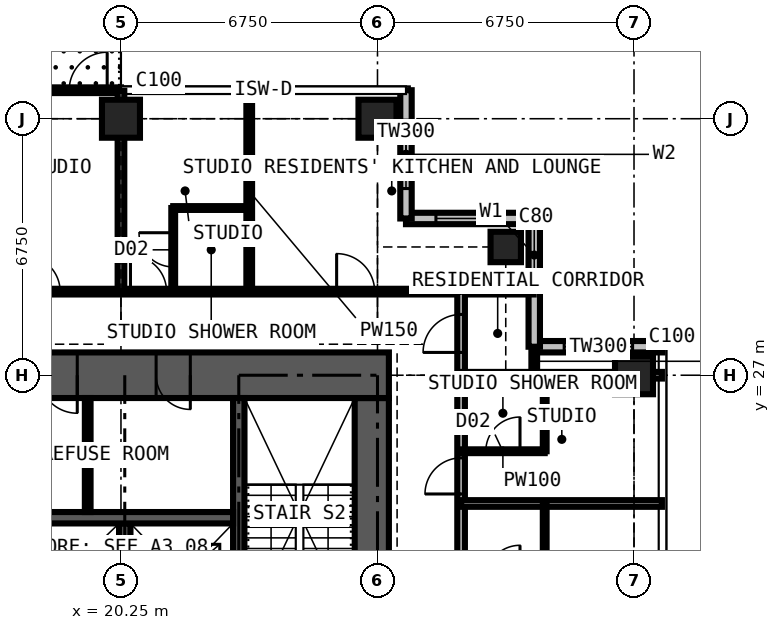
"""IFC4 building model, lengths in metres.
Left out: names, types, materials, properties, quantities, classifications, styles, units other than length and angle.
Written with IfcOpenShell. Run it as: python <this file> out.ifc"""

import sys

from ifc_helpers import new_model, si_unit, direction, frame, frame_2d, origin, origin_2d, place, context, subcontext, project, spatial, rectangle, extrude, element, fill, save


model = new_model("IFC4")
c1 = context("Model", 3, precision=1e-05, world=origin(), true_north=direction((0.0, 1.0)))
c2 = subcontext(c1, "Body", "Model", "MODEL_VIEW")
j1 = project(units=[si_unit("LENGTHUNIT", "METRE"), si_unit("PLANEANGLEUNIT", "RADIAN")], contexts=[c1])
p1 = place(None, origin())
s1 = spatial("IfcSite", under=j1, at=p1, CompositionType="ELEMENT")
p2 = place(p1, origin())
s2 = spatial("IfcBuilding", under=s1, at=p2, CompositionType="ELEMENT")
p3 = place(p2, frame((0.0, 0.0, 240.3)))
s3 = spatial("IfcBuildingStorey", under=s2, at=p3, CompositionType="ELEMENT", Elevation=240.3)
for number, where, z_axis, x_axis in (
    (1, (20.25, 33.75, 0.0), (0.0, 0.0, 1.0), (1.0, 0.0, 0.0)),
    (2, (27.0, 33.75, 0.0), (0.0, 0.0, 1.0), (1.0, 0.0, 0.0)),
):
    element("IfcColumn", number, at=place(p3, frame(where, z_axis=z_axis, x_axis=x_axis)), inside=s3, PredefinedType="COLUMN", context=c2, shape_type="SweptSolid", body=[
        extrude(rectangle(XDim=1.0, YDim=1.0, at=origin_2d()), origin(), (0.0, 0.0, 1.0), 3.6),
    ])
p4 = place(p3, frame((30.375, 30.375, 0.0), z_axis=(0.0, 0.0, 1.0), x_axis=(1.0, 0.0, 0.0)))
e3 = element("IfcColumn", 3, at=p4, inside=s3, PredefinedType="COLUMN", context=c2, shape_type="SweptSolid", body=[
    extrude(rectangle(XDim=0.8, YDim=0.8, at=origin_2d()), origin(), (0.0, 0.0, 1.0), 3.6),
])
p5 = place(p3, frame((33.75, 27.0, 0.0), z_axis=(0.0, 0.0, 1.0), x_axis=(1.0, 0.0, 0.0)))
e4 = element("IfcColumn", 4, at=p5, inside=s3, PredefinedType="COLUMN", context=c2, shape_type="SweptSolid", body=[
    extrude(rectangle(XDim=1.0, YDim=1.0, at=origin_2d()), origin(), (0.0, 0.0, 1.0), 3.6),
])
p6 = place(p3, frame((26.85, 14.1, 0.0), z_axis=(0.0, 0.0, 1.0), x_axis=(0.0, 1.0, 0.0)))
e5 = element("IfcWall", 5, at=p6, inside=s3, PredefinedType="SHEAR", context=c2, shape_type="SweptSolid", body=[
    extrude(rectangle(XDim=12.3, YDim=0.9, at=frame_2d((6.15, 0.0))), origin(), (0.0, 0.0, 1.0), 3.6),
])
p7 = place(p6, frame((3.65, 0.0, 0.0)))
e6 = element("IfcOpeningElement", 6, at=p7, cuts=e5, PredefinedType="OPENING", context=c2, shape_type="SweptSolid", body=[
    extrude(rectangle(XDim=1.2, YDim=2.2, at=frame_2d((0.6, 1.1))), frame((0.0, 0.46, 0.0), z_axis=(0.0, -1.0, 0.0), x_axis=(1.0, 0.0, 0.0)), (0.0, 0.0, 1.0), 0.92),
])
p8 = place(p3, frame((27.3, 27.0, 0.0), z_axis=(0.0, 0.0, 1.0), x_axis=(-1.0, 0.0, 0.0)))
e7 = element("IfcWall", 7, at=p8, inside=s3, PredefinedType="SHEAR", context=c2, shape_type="SweptSolid", body=[
    extrude(rectangle(XDim=14.1, YDim=1.2, at=frame_2d((7.05, 0.0))), origin(), (0.0, 0.0, 1.0), 3.6),
])
p9 = place(p8, frame((5.225, 0.0, 0.0)))
e8 = element("IfcOpeningElement", 8, at=p9, cuts=e7, PredefinedType="OPENING", context=c2, shape_type="SweptSolid", body=[
    extrude(rectangle(XDim=0.9, YDim=2.2, at=frame_2d((0.45, 1.1))), frame((0.0, 0.61, 0.0), z_axis=(0.0, -1.0, 0.0), x_axis=(1.0, 0.0, 0.0)), (0.0, 0.0, 1.0), 1.22),
])
p10 = place(p8, frame((8.2, 0.0, 0.0)))
e9 = element("IfcOpeningElement", 9, at=p10, cuts=e7, PredefinedType="OPENING", context=c2, shape_type="SweptSolid", body=[
    extrude(rectangle(XDim=1.0, YDim=2.2, at=frame_2d((0.5, 1.1))), frame((0.0, 0.61, 0.0), z_axis=(0.0, -1.0, 0.0), x_axis=(1.0, 0.0, 0.0)), (0.0, 0.0, 1.0), 1.22),
])
p11 = place(p3, frame((34.5, 27.75, 0.0), z_axis=(0.0, 0.0, 1.0), x_axis=(-1.0, 0.0, 0.0)))
e10 = element("IfcWall", 10, at=p11, inside=s3, PredefinedType="SOLIDWALL", context=c2, shape_type="SweptSolid", body=[
    extrude(rectangle(XDim=3.375, YDim=0.3, at=frame_2d((1.688, 0.0))), origin(), (0.0, 0.0, 1.0), 3.375),
])
p12 = place(p11, frame((0.788, 0.0, 0.6)))
e11 = element("IfcOpeningElement", 11, at=p12, cuts=e10, PredefinedType="OPENING", context=c2, shape_type="SweptSolid", body=[
    extrude(rectangle(XDim=1.8, YDim=2.1, at=frame_2d((0.9, 1.05))), frame((0.0, 0.16, 0.0), z_axis=(0.0, -1.0, 0.0), x_axis=(1.0, 0.0, 0.0)), (0.0, 0.0, 1.0), 0.32),
])
p13 = place(p3, frame((31.125, 27.75, 0.0), z_axis=(0.0, 0.0, 1.0), x_axis=(0.0, 1.0, 0.0)))
e12 = element("IfcWall", 12, at=p13, inside=s3, PredefinedType="SOLIDWALL", context=c2, shape_type="SweptSolid", body=[
    extrude(rectangle(XDim=3.375, YDim=0.3, at=frame_2d((1.688, 0.0))), origin(), (0.0, 0.0, 1.0), 3.375),
])
p14 = place(p13, frame((1.663, 0.0, 0.9)))
e13 = element("IfcOpeningElement", 13, at=p14, cuts=e12, PredefinedType="OPENING", context=c2, shape_type="SweptSolid", body=[
    extrude(rectangle(XDim=1.5, YDim=1.8, at=frame_2d((0.75, 0.9))), frame((0.0, 0.16, 0.0), z_axis=(0.0, -1.0, 0.0), x_axis=(1.0, 0.0, 0.0)), (0.0, 0.0, 1.0), 0.32),
])
p15 = place(p3, frame((31.125, 31.125, 0.0), z_axis=(0.0, 0.0, 1.0), x_axis=(-1.0, 0.0, 0.0)))
e14 = element("IfcWall", 14, at=p15, inside=s3, PredefinedType="SOLIDWALL", context=c2, shape_type="SweptSolid", body=[
    extrude(rectangle(XDim=3.375, YDim=0.3, at=frame_2d((1.688, 0.0))), origin(), (0.0, 0.0, 1.0), 3.375),
])
p16 = place(p15, frame((0.788, 0.0, 0.6)))
e15 = element("IfcOpeningElement", 15, at=p16, cuts=e14, PredefinedType="OPENING", context=c2, shape_type="SweptSolid", body=[
    extrude(rectangle(XDim=1.8, YDim=2.1, at=frame_2d((0.9, 1.05))), frame((0.0, 0.16, 0.0), z_axis=(0.0, -1.0, 0.0), x_axis=(1.0, 0.0, 0.0)), (0.0, 0.0, 1.0), 0.32),
])
p17 = place(p3, frame((27.75, 31.125, 0.0), z_axis=(0.0, 0.0, 1.0), x_axis=(0.0, 1.0, 0.0)))
e16 = element("IfcWall", 16, at=p17, inside=s3, PredefinedType="SOLIDWALL", context=c2, shape_type="SweptSolid", body=[
    extrude(rectangle(XDim=3.375, YDim=0.3, at=frame_2d((1.688, 0.0))), origin(), (0.0, 0.0, 1.0), 3.375),
])
p18 = place(p17, frame((0.788, 0.0, 0.6)))
e17 = element("IfcOpeningElement", 17, at=p18, cuts=e16, PredefinedType="OPENING", context=c2, shape_type="SweptSolid", body=[
    extrude(rectangle(XDim=1.8, YDim=2.1, at=frame_2d((0.9, 1.05))), frame((0.0, 0.16, 0.0), z_axis=(0.0, -1.0, 0.0), x_axis=(1.0, 0.0, 0.0)), (0.0, 0.0, 1.0), 0.32),
])
p19 = place(p3, frame((13.5, 34.5, 0.0), z_axis=(0.0, 0.0, 1.0), x_axis=(1.0, 0.0, 0.0)))
e18 = element("IfcWall", 18, at=p19, inside=s3, PredefinedType="SOLIDWALL", context=c2, shape_type="SweptSolid", body=[
    extrude(rectangle(XDim=6.75, YDim=0.15, at=frame_2d((3.375, 0.0))), origin(), (0.0, 0.0, 1.0), 3.375),
])
p20 = place(p19, frame((0.363, 0.0, 0.0)))
e19 = element("IfcOpeningElement", 19, at=p20, cuts=e18, PredefinedType="OPENING", context=c2, shape_type="SweptSolid", body=[
    extrude(rectangle(XDim=1.0, YDim=2.2, at=frame_2d((0.5, 1.1))), frame((0.0, 0.085, 0.0), z_axis=(0.0, -1.0, 0.0), x_axis=(1.0, 0.0, 0.0)), (0.0, 0.0, 1.0), 0.17),
])
p21 = place(p19, frame((1.725, 0.0, 0.9)))
e20 = element("IfcOpeningElement", 20, at=p21, cuts=e18, PredefinedType="OPENING", context=c2, shape_type="SweptSolid", body=[
    extrude(rectangle(XDim=1.2, YDim=1.8, at=frame_2d((0.6, 0.9))), frame((0.0, 0.085, 0.0), z_axis=(0.0, -1.0, 0.0), x_axis=(1.0, 0.0, 0.0)), (0.0, 0.0, 1.0), 0.17),
])
p22 = place(p19, frame((5.387, 0.0, 0.0)))
e21 = element("IfcOpeningElement", 21, at=p22, cuts=e18, PredefinedType="OPENING", context=c2, shape_type="SweptSolid", body=[
    extrude(rectangle(XDim=1.0, YDim=2.2, at=frame_2d((0.5, 1.1))), frame((0.0, 0.085, 0.0), z_axis=(0.0, -1.0, 0.0), x_axis=(1.0, 0.0, 0.0)), (0.0, 0.0, 1.0), 0.17),
])
p23 = place(p19, frame((3.825, 0.0, 0.9)))
e22 = element("IfcOpeningElement", 22, at=p23, cuts=e18, PredefinedType="OPENING", context=c2, shape_type="SweptSolid", body=[
    extrude(rectangle(XDim=1.2, YDim=1.8, at=frame_2d((0.6, 0.9))), frame((0.0, 0.085, 0.0), z_axis=(0.0, -1.0, 0.0), x_axis=(1.0, 0.0, 0.0)), (0.0, 0.0, 1.0), 0.17),
])
p24 = place(p3, frame((23.35, 20.3, 0.0), z_axis=(0.0, 0.0, 1.0), x_axis=(0.0, 1.0, 0.0)))
e23 = element("IfcWall", 23, at=p24, inside=s3, PredefinedType="SHEAR", context=c2, shape_type="SweptSolid", body=[
    extrude(rectangle(XDim=6.1, YDim=0.3, at=frame_2d((3.05, 0.0))), origin(), (0.0, 0.0, 1.0), 3.6),
])
p25 = place(p3, frame((20.35, 20.3, 0.0), z_axis=(0.0, 0.0, 1.0), x_axis=(0.0, 1.0, 0.0)))
e24 = element("IfcWall", 24, at=p25, inside=s3, PredefinedType="SHEAR", context=c2, shape_type="SweptSolid", body=[
    extrude(rectangle(XDim=2.8, YDim=0.3, at=frame_2d((1.4, 0.0))), origin(), (0.0, 0.0, 1.0), 3.6),
])
p26 = place(p3, frame((17.3, 23.25, 0.0), z_axis=(0.0, 0.0, 1.0), x_axis=(1.0, 0.0, 0.0)))
e25 = element("IfcWall", 25, at=p26, inside=s3, PredefinedType="SHEAR", context=c2, shape_type="SweptSolid", body=[
    extrude(rectangle(XDim=5.9, YDim=0.3, at=frame_2d((2.95, 0.0))), origin(), (0.0, 0.0, 1.0), 3.6),
])
p27 = place(p3, frame((19.375, 23.4, 0.0), z_axis=(0.0, 0.0, 1.0), x_axis=(0.0, 1.0, 0.0)))
e26 = element("IfcWall", 26, at=p27, inside=s3, PredefinedType="PARTITIONING", context=c2, shape_type="SweptSolid", body=[
    extrude(rectangle(XDim=3.0, YDim=0.15, at=frame_2d((1.5, 0.0))), origin(), (0.0, 0.0, 1.0), 3.375),
])
p28 = place(p3, frame((11.3, 29.2, 0.0), z_axis=(0.0, 0.0, 1.0), x_axis=(1.0, 0.0, 0.0)))
e27 = element("IfcWall", 27, at=p28, inside=s3, PredefinedType="PARTITIONING", context=c2, shape_type="SweptSolid", body=[
    extrude(rectangle(XDim=19.809, YDim=0.15, at=frame_2d((9.904, 0.0))), origin(), (0.0, 0.0, 1.0), 3.375),
])
p29 = place(p28, frame((14.625, 0.0, 0.0)))
e28 = element("IfcOpeningElement", 28, at=p29, cuts=e27, PredefinedType="OPENING", context=c2, shape_type="SweptSolid", body=[
    extrude(rectangle(XDim=1.0, YDim=2.2, at=frame_2d((0.5, 1.1))), frame((0.0, 0.085, 0.0), z_axis=(0.0, -1.0, 0.0), x_axis=(1.0, 0.0, 0.0)), (0.0, 0.0, 1.0), 0.17),
])
p30 = place(p28, frame((6.4, 0.0, 0.0)))
e29 = element("IfcOpeningElement", 29, at=p30, cuts=e27, PredefinedType="OPENING", context=c2, shape_type="SweptSolid", body=[
    extrude(rectangle(XDim=0.95, YDim=2.2, at=frame_2d((0.475, 1.1))), frame((0.0, 0.085, 0.0), z_axis=(0.0, -1.0, 0.0), x_axis=(1.0, 0.0, 0.0)), (0.0, 0.0, 1.0), 0.17),
])
p31 = place(p28, frame((9.2, 0.0, 0.0)))
e30 = element("IfcOpeningElement", 30, at=p31, cuts=e27, PredefinedType="OPENING", context=c2, shape_type="SweptSolid", body=[
    extrude(rectangle(XDim=0.95, YDim=2.2, at=frame_2d((0.475, 1.1))), frame((0.0, 0.085, 0.0), z_axis=(0.0, -1.0, 0.0), x_axis=(1.0, 0.0, 0.0)), (0.0, 0.0, 1.0), 0.17),
])
p32 = place(p28, frame((0.6, 0.0, 0.0)))
e31 = element("IfcOpeningElement", 31, at=p32, cuts=e27, PredefinedType="OPENING", context=c2, shape_type="SweptSolid", body=[
    extrude(rectangle(XDim=1.0, YDim=2.2, at=frame_2d((0.5, 1.1))), frame((0.0, 0.085, 0.0), z_axis=(0.0, -1.0, 0.0), x_axis=(1.0, 0.0, 0.0)), (0.0, 0.0, 1.0), 0.17),
])
p33 = place(p3, frame((20.25, 29.2, 0.0), z_axis=(0.0, 0.0, 1.0), x_axis=(0.0, 1.0, 0.0)))
e32 = element("IfcWall", 32, at=p33, inside=s3, PredefinedType="PARTITIONING", context=c2, shape_type="SweptSolid", body=[
    extrude(rectangle(XDim=5.284, YDim=0.175, at=frame_2d((2.642, 0.0))), origin(), (0.0, 0.0, 1.0), 2.877),
])
p34 = place(p3, frame((21.625, 29.2, 0.0), z_axis=(0.0, 0.0, 1.0), x_axis=(0.0, 1.0, 0.0)))
e33 = element("IfcWall", 33, at=p34, inside=s3, PredefinedType="PARTITIONING", context=c2, shape_type="SweptSolid", body=[
    extrude(rectangle(XDim=2.2, YDim=0.1, at=frame_2d((1.1, 0.0))), origin(), (0.0, 0.0, 1.0), 3.375),
])
p35 = place(p34, frame((0.65, 0.0, 0.0)))
e34 = element("IfcOpeningElement", 34, at=p35, cuts=e33, PredefinedType="OPENING", context=c2, shape_type="SweptSolid", body=[
    extrude(rectangle(XDim=0.9, YDim=2.2, at=frame_2d((0.45, 1.1))), frame((0.0, 0.06, 0.0), z_axis=(0.0, -1.0, 0.0), x_axis=(1.0, 0.0, 0.0)), (0.0, 0.0, 1.0), 0.12),
])
p36 = place(p3, frame((21.625, 31.4, 0.0), z_axis=(0.0, 0.0, 1.0), x_axis=(1.0, 0.0, 0.0)))
e35 = element("IfcWall", 35, at=p36, inside=s3, PredefinedType="PARTITIONING", context=c2, shape_type="SweptSolid", body=[
    extrude(rectangle(XDim=2.0, YDim=0.1, at=frame_2d((1.0, 0.0))), origin(), (0.0, 0.0, 1.0), 3.375),
])
p37 = place(p3, frame((23.625, 29.2, 0.0), z_axis=(0.0, 0.0, 1.0), x_axis=(0.0, 1.0, 0.0)))
e36 = element("IfcWall", 36, at=p37, inside=s3, PredefinedType="PARTITIONING", context=c2, shape_type="SweptSolid", body=[
    extrude(rectangle(XDim=5.284, YDim=0.15, at=frame_2d((2.642, 0.0))), origin(), (0.0, 0.0, 1.0), 3.375),
])
p38 = place(p3, frame((29.2, 11.3, 0.0), z_axis=(0.0, 0.0, 1.0), x_axis=(0.0, 1.0, 0.0)))
e37 = element("IfcWall", 37, at=p38, inside=s3, PredefinedType="PARTITIONING", context=c2, shape_type="SweptSolid", body=[
    extrude(rectangle(XDim=17.9, YDim=0.2, at=frame_2d((8.95, 0.0))), origin(), (0.0, 0.0, 1.0), 3.375),
])
p39 = place(p38, frame((0.6, 0.0, 0.0)))
e38 = element("IfcOpeningElement", 38, at=p39, cuts=e37, PredefinedType="OPENING", context=c2, shape_type="SweptSolid", body=[
    extrude(rectangle(XDim=1.0, YDim=2.2, at=frame_2d((0.5, 1.1))), frame((0.0, 0.11, 0.0), z_axis=(0.0, -1.0, 0.0), x_axis=(1.0, 0.0, 0.0)), (0.0, 0.0, 1.0), 0.22),
])
p40 = place(p38, frame((2.4, 0.0, 0.0)))
e39 = element("IfcOpeningElement", 39, at=p40, cuts=e37, PredefinedType="OPENING", context=c2, shape_type="SweptSolid", body=[
    extrude(rectangle(XDim=0.95, YDim=2.2, at=frame_2d((0.475, 1.1))), frame((0.0, 0.11, 0.0), z_axis=(0.0, -1.0, 0.0), x_axis=(1.0, 0.0, 0.0)), (0.0, 0.0, 1.0), 0.22),
])
p41 = place(p38, frame((5.825, 0.0, 0.0)))
e40 = element("IfcOpeningElement", 40, at=p41, cuts=e37, PredefinedType="OPENING", context=c2, shape_type="SweptSolid", body=[
    extrude(rectangle(XDim=0.95, YDim=2.2, at=frame_2d((0.475, 1.1))), frame((0.0, 0.11, 0.0), z_axis=(0.0, -1.0, 0.0), x_axis=(1.0, 0.0, 0.0)), (0.0, 0.0, 1.0), 0.22),
])
p42 = place(p38, frame((9.2, 0.0, 0.0)))
e41 = element("IfcOpeningElement", 41, at=p42, cuts=e37, PredefinedType="OPENING", context=c2, shape_type="SweptSolid", body=[
    extrude(rectangle(XDim=0.95, YDim=2.2, at=frame_2d((0.475, 1.1))), frame((0.0, 0.11, 0.0), z_axis=(0.0, -1.0, 0.0), x_axis=(1.0, 0.0, 0.0)), (0.0, 0.0, 1.0), 0.22),
])
p43 = place(p38, frame((12.575, 0.0, 0.0)))
e42 = element("IfcOpeningElement", 42, at=p43, cuts=e37, PredefinedType="OPENING", context=c2, shape_type="SweptSolid", body=[
    extrude(rectangle(XDim=0.95, YDim=2.2, at=frame_2d((0.475, 1.1))), frame((0.0, 0.11, 0.0), z_axis=(0.0, -1.0, 0.0), x_axis=(1.0, 0.0, 0.0)), (0.0, 0.0, 1.0), 0.22),
])
p44 = place(p38, frame((16.3, 0.0, 0.0)))
e43 = element("IfcOpeningElement", 43, at=p44, cuts=e37, PredefinedType="OPENING", context=c2, shape_type="SweptSolid", body=[
    extrude(rectangle(XDim=1.0, YDim=2.2, at=frame_2d((0.5, 1.1))), frame((0.0, 0.11, 0.0), z_axis=(0.0, -1.0, 0.0), x_axis=(1.0, 0.0, 0.0)), (0.0, 0.0, 1.0), 0.22),
])
p45 = place(p3, frame((29.2, 23.625, 0.0), z_axis=(0.0, 0.0, 1.0), x_axis=(1.0, 0.0, 0.0)))
e44 = element("IfcWall", 44, at=p45, inside=s3, PredefinedType="PARTITIONING", context=c2, shape_type="SweptSolid", body=[
    extrude(rectangle(XDim=5.284, YDim=0.175, at=frame_2d((2.642, 0.0))), origin(), (0.0, 0.0, 1.0), 3.375),
])
p46 = place(p3, frame((29.2, 25.0, 0.0), z_axis=(0.0, 0.0, 1.0), x_axis=(1.0, 0.0, 0.0)))
e45 = element("IfcWall", 45, at=p46, inside=s3, PredefinedType="PARTITIONING", context=c2, shape_type="SweptSolid", body=[
    extrude(rectangle(XDim=2.2, YDim=0.1, at=frame_2d((1.1, 0.0))), origin(), (0.0, 0.0, 1.0), 3.375),
])
p47 = place(p46, frame((0.65, 0.0, 0.0)))
e46 = element("IfcOpeningElement", 46, at=p47, cuts=e45, PredefinedType="OPENING", context=c2, shape_type="SweptSolid", body=[
    extrude(rectangle(XDim=0.9, YDim=2.2, at=frame_2d((0.45, 1.1))), frame((0.0, 0.06, 0.0), z_axis=(0.0, -1.0, 0.0), x_axis=(1.0, 0.0, 0.0)), (0.0, 0.0, 1.0), 0.12),
])
p48 = place(p3, frame((29.2, 27.0, 0.0), z_axis=(0.0, 0.0, 1.0), x_axis=(1.0, 0.0, 0.0)))
e47 = element("IfcWall", 47, at=p48, inside=s3, PredefinedType="PARTITIONING", context=c2, shape_type="SweptSolid", body=[
    extrude(rectangle(XDim=5.284, YDim=0.175, at=frame_2d((2.642, 0.0))), origin(), (0.0, 0.0, 1.0), 2.877),
])
p49 = place(p3, frame((31.125, 27.0, 0.0), z_axis=(0.0, 0.0, 1.0), x_axis=(0.0, 1.0, 0.0)))
e48 = element("IfcWall", 48, at=p49, inside=s3, PredefinedType="PARTITIONING", context=c2, shape_type="SweptSolid", body=[
    extrude(rectangle(XDim=0.734, YDim=0.15, at=frame_2d((0.367, 0.0))), origin(), (0.0, 0.0, 1.0), 3.375),
])
for number, where, z_axis, x_axis in (
    (49, (31.4, 21.625, 0.0), (0.0, 0.0, 1.0), (0.0, 1.0, 0.0)),
    (50, (31.4, 25.0, 0.0), (0.0, 0.0, 1.0), (0.0, 1.0, 0.0)),
):
    element("IfcWall", number, at=place(p3, frame(where, z_axis=z_axis, x_axis=x_axis)), inside=s3, PredefinedType="PARTITIONING", context=c2, shape_type="SweptSolid", body=[
        extrude(rectangle(XDim=2.0, YDim=0.1, at=frame_2d((1.0, 0.0))), origin(), (0.0, 0.0, 1.0), 3.375),
    ])
p50 = place(p12, origin())
e51 = element("IfcWindow", 51, at=p50, inside=s3, PartitioningType="SINGLE_PANEL", PredefinedType="WINDOW", context=c2, shape_type="SweptSolid", body=[
    extrude(rectangle(XDim=1.8, YDim=2.1, at=frame_2d((0.9, 1.05))), frame((0.0, 0.03, 0.0), z_axis=(0.0, -1.0, 0.0), x_axis=(1.0, 0.0, 0.0)), (0.0, 0.0, 1.0), 0.06),
])
fill(e11, e51)
p51 = place(p14, origin())
e52 = element("IfcWindow", 52, at=p51, inside=s3, PartitioningType="SINGLE_PANEL", PredefinedType="WINDOW", context=c2, shape_type="SweptSolid", body=[
    extrude(rectangle(XDim=1.5, YDim=1.8, at=frame_2d((0.75, 0.9))), frame((0.0, 0.03, 0.0), z_axis=(0.0, -1.0, 0.0), x_axis=(1.0, 0.0, 0.0)), (0.0, 0.0, 1.0), 0.06),
])
fill(e13, e52)
p52 = place(p16, origin())
e53 = element("IfcWindow", 53, at=p52, inside=s3, PartitioningType="SINGLE_PANEL", PredefinedType="WINDOW", context=c2, shape_type="SweptSolid", body=[
    extrude(rectangle(XDim=1.8, YDim=2.1, at=frame_2d((0.9, 1.05))), frame((0.0, 0.03, 0.0), z_axis=(0.0, -1.0, 0.0), x_axis=(1.0, 0.0, 0.0)), (0.0, 0.0, 1.0), 0.06),
])
fill(e15, e53)
p53 = place(p18, origin())
e54 = element("IfcWindow", 54, at=p53, inside=s3, PartitioningType="SINGLE_PANEL", PredefinedType="WINDOW", context=c2, shape_type="SweptSolid", body=[
    extrude(rectangle(XDim=1.8, YDim=2.1, at=frame_2d((0.9, 1.05))), frame((0.0, 0.03, 0.0), z_axis=(0.0, -1.0, 0.0), x_axis=(1.0, 0.0, 0.0)), (0.0, 0.0, 1.0), 0.06),
])
fill(e17, e54)
p54 = place(p22, origin())
e55 = element("IfcDoor", 55, at=p54, inside=s3, OperationType="SINGLE_SWING_RIGHT", PredefinedType="DOOR", context=c2, shape_type="SweptSolid", body=[
    extrude(rectangle(XDim=1.0, YDim=2.2, at=frame_2d((0.5, 1.1))), frame((0.0, 0.025, 0.0), z_axis=(0.0, -1.0, 0.0), x_axis=(1.0, 0.0, 0.0)), (0.0, 0.0, 1.0), 0.05),
])
fill(e21, e55)
p55 = place(p23, origin())
e56 = element("IfcWindow", 56, at=p55, inside=s3, PartitioningType="SINGLE_PANEL", PredefinedType="WINDOW", context=c2, shape_type="SweptSolid", body=[
    extrude(rectangle(XDim=1.2, YDim=1.8, at=frame_2d((0.6, 0.9))), frame((0.0, 0.03, 0.0), z_axis=(0.0, -1.0, 0.0), x_axis=(1.0, 0.0, 0.0)), (0.0, 0.0, 1.0), 0.06),
])
fill(e22, e56)
p56 = place(p9, origin())
e57 = element("IfcDoor", 57, at=p56, inside=s3, OperationType="SINGLE_SWING_LEFT", PredefinedType="DOOR", context=c2, shape_type="SweptSolid", body=[
    extrude(rectangle(XDim=0.9, YDim=2.2, at=frame_2d((0.45, 1.1))), frame((0.0, 0.4, 0.0), z_axis=(0.0, -1.0, 0.0), x_axis=(1.0, 0.0, 0.0)), (0.0, 0.0, 1.0), 0.8),
])
fill(e8, e57)
p57 = place(p10, origin())
e58 = element("IfcDoor", 58, at=p57, inside=s3, OperationType="SINGLE_SWING_LEFT", PredefinedType="DOOR", context=c2, shape_type="SweptSolid", body=[
    extrude(rectangle(XDim=1.0, YDim=2.2, at=frame_2d((0.5, 1.1))), frame((0.0, 0.025, 0.0), z_axis=(0.0, -1.0, 0.0), x_axis=(1.0, 0.0, 0.0)), (0.0, 0.0, 1.0), 0.05),
])
fill(e9, e58)
p58 = place(p43, origin())
e59 = element("IfcDoor", 59, at=p58, inside=s3, OperationType="SINGLE_SWING_LEFT", PredefinedType="DOOR", context=c2, shape_type="SweptSolid", body=[
    extrude(rectangle(XDim=0.95, YDim=2.2, at=frame_2d((0.475, 1.1))), frame((0.0, 0.025, 0.0), z_axis=(0.0, -1.0, 0.0), x_axis=(1.0, 0.0, 0.0)), (0.0, 0.0, 1.0), 0.05),
])
fill(e42, e59)
p59 = place(p47, origin())
e60 = element("IfcDoor", 60, at=p59, inside=s3, OperationType="SINGLE_SWING_RIGHT", PredefinedType="DOOR", context=c2, shape_type="SweptSolid", body=[
    extrude(rectangle(XDim=0.9, YDim=2.2, at=frame_2d((0.45, 1.1))), frame((0.0, 0.025, 0.0), z_axis=(0.0, -1.0, 0.0), x_axis=(1.0, 0.0, 0.0)), (0.0, 0.0, 1.0), 0.05),
])
fill(e46, e60)
p60 = place(p44, origin())
e61 = element("IfcDoor", 61, at=p60, inside=s3, OperationType="SINGLE_SWING_LEFT", PredefinedType="DOOR", context=c2, shape_type="SweptSolid", body=[
    extrude(rectangle(XDim=1.0, YDim=2.2, at=frame_2d((0.5, 1.1))), frame((0.0, 0.025, 0.0), z_axis=(0.0, -1.0, 0.0), x_axis=(1.0, 0.0, 0.0)), (0.0, 0.0, 1.0), 0.05),
])
fill(e43, e61)
p61 = place(p29, origin())
e62 = element("IfcDoor", 62, at=p61, inside=s3, OperationType="SINGLE_SWING_LEFT", PredefinedType="DOOR", context=c2, shape_type="SweptSolid", body=[
    extrude(rectangle(XDim=1.0, YDim=2.2, at=frame_2d((0.5, 1.1))), frame((0.0, 0.025, 0.0), z_axis=(0.0, -1.0, 0.0), x_axis=(1.0, 0.0, 0.0)), (0.0, 0.0, 1.0), 0.05),
])
fill(e28, e62)
p62 = place(p30, origin())
e63 = element("IfcDoor", 63, at=p62, inside=s3, OperationType="SINGLE_SWING_LEFT", PredefinedType="DOOR", context=c2, shape_type="SweptSolid", body=[
    extrude(rectangle(XDim=0.95, YDim=2.2, at=frame_2d((0.475, 1.1))), frame((0.0, 0.025, 0.0), z_axis=(0.0, -1.0, 0.0), x_axis=(1.0, 0.0, 0.0)), (0.0, 0.0, 1.0), 0.05),
])
fill(e29, e63)
p63 = place(p31, origin())
e64 = element("IfcDoor", 64, at=p63, inside=s3, OperationType="SINGLE_SWING_LEFT", PredefinedType="DOOR", context=c2, shape_type="SweptSolid", body=[
    extrude(rectangle(XDim=0.95, YDim=2.2, at=frame_2d((0.475, 1.1))), frame((0.0, 0.025, 0.0), z_axis=(0.0, -1.0, 0.0), x_axis=(1.0, 0.0, 0.0)), (0.0, 0.0, 1.0), 0.05),
])
fill(e30, e64)
p64 = place(p35, origin())
e65 = element("IfcDoor", 65, at=p64, inside=s3, OperationType="SINGLE_SWING_RIGHT", PredefinedType="DOOR", context=c2, shape_type="SweptSolid", body=[
    extrude(rectangle(XDim=0.9, YDim=2.2, at=frame_2d((0.45, 1.1))), frame((0.0, 0.025, 0.0), z_axis=(0.0, -1.0, 0.0), x_axis=(1.0, 0.0, 0.0)), (0.0, 0.0, 1.0), 0.05),
])
fill(e34, e65)
save(model, sys.argv[1])
